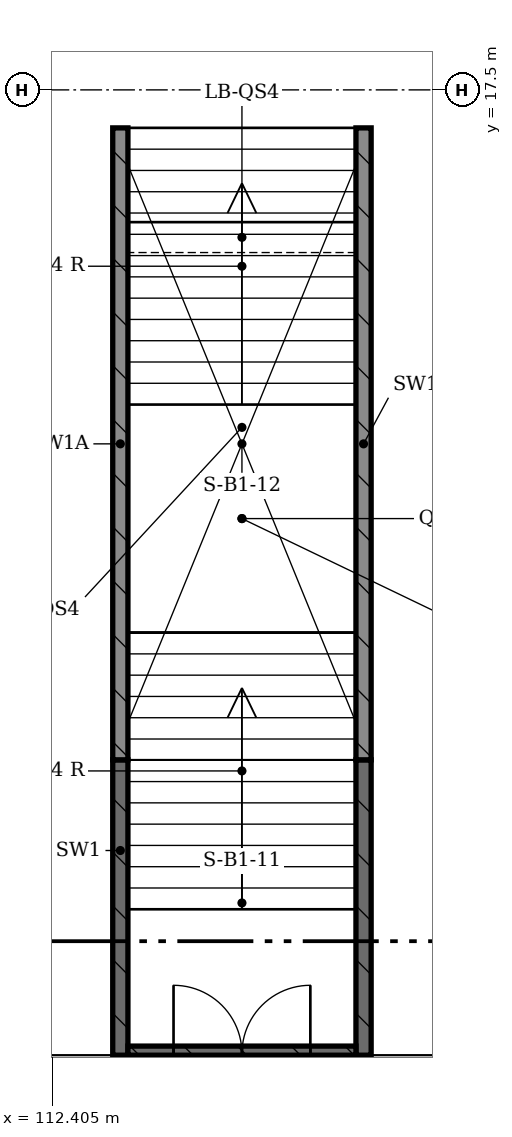
"""IFC4 building model, lengths in metres.
Left out: names, types, materials, properties, quantities, classifications, styles, units other than length and angle.
Written with IfcOpenShell. Run it as: python <this file> out.ifc"""

import sys

from ifc_helpers import new_model, si_unit, direction, frame, frame_2d, origin, place, context, subcontext, project, spatial, rectangle, extrude, element, fill, save


model = new_model("IFC4")
c1 = context("Model", 3, precision=1e-05, world=origin(), true_north=direction((0.0, 1.0)))
c2 = subcontext(c1, "Body", "Model", "MODEL_VIEW")
j1 = project(units=[si_unit("LENGTHUNIT", "METRE"), si_unit("PLANEANGLEUNIT", "RADIAN")], contexts=[c1])
p1 = place(None, origin())
s1 = spatial("IfcSite", under=j1, at=p1, CompositionType="ELEMENT")
p2 = place(p1, origin())
s2 = spatial("IfcBuilding", under=s1, at=p2, CompositionType="ELEMENT")
p3 = place(p2, frame((0.0, 0.0, -4.5)))
s3 = spatial("IfcBuildingStorey", under=s2, at=p3, CompositionType="ELEMENT", Elevation=-4.5)
for number, where, z_axis, x_axis in (
    (1, (113.3, 4.72, 0.0), (0.0, 0.0, 1.0), (0.0, 1.0, 0.0)),
    (2, (116.5, 4.72, 0.0), (0.0, 0.0, 1.0), (0.0, 1.0, 0.0)),
):
    element("IfcWall", number, at=place(p3, frame(where, z_axis=z_axis, x_axis=x_axis)), inside=s3, PredefinedType="SHEAR", context=c2, shape_type="SweptSolid", body=[
        extrude(rectangle(XDim=3.966, YDim=0.2, at=frame_2d((1.983, 0.0))), origin(), (0.0, 0.0, 1.0), 3.5),
    ])
p4 = place(p3, frame((113.4, 4.82, 0.0), z_axis=(0.0, 0.0, 1.0), x_axis=(1.0, 0.0, 0.0)))
e3 = element("IfcWall", 3, at=p4, inside=s3, PredefinedType="SHEAR", context=c2, shape_type="SweptSolid", body=[
    extrude(rectangle(XDim=3.0, YDim=0.2, at=frame_2d((1.5, 0.0))), origin(), (0.0, 0.0, 1.0), 3.5),
])
p5 = place(p4, frame((0.6, 0.0, 0.0)))
e4 = element("IfcOpeningElement", 4, at=p5, cuts=e3, PredefinedType="OPENING", context=c2, shape_type="SweptSolid", body=[
    extrude(rectangle(XDim=1.8, YDim=2.1, at=frame_2d((0.9, 1.05))), frame((0.0, 0.1, 0.0), z_axis=(0.0, -1.0, 0.0), x_axis=(1.0, 0.0, 0.0)), (0.0, 0.0, 1.0), 0.2),
])
for number, where, z_axis, x_axis in (
    (5, (113.3, 8.686, 0.0), (0.0, 0.0, 1.0), (0.0, 1.0, 0.0)),
    (6, (116.5, 8.686, 0.0), (0.0, 0.0, 1.0), (0.0, 1.0, 0.0)),
):
    element("IfcWall", number, at=place(p3, frame(where, z_axis=z_axis, x_axis=x_axis)), inside=s3, PredefinedType="SHEAR", context=c2, shape_type="SweptSolid", body=[
        extrude(rectangle(XDim=8.314, YDim=0.2, at=frame_2d((4.157, 0.0))), origin(), (0.0, 0.0, 1.0), 5.6),
    ])
p6 = place(p5, origin())
e7 = element("IfcDoor", 7, at=p6, inside=s3, OperationType="DOUBLE_DOOR_SINGLE_SWING", PredefinedType="DOOR", context=c2, shape_type="SweptSolid", body=[
    extrude(rectangle(XDim=1.8, YDim=2.1, at=frame_2d((0.9, 1.05))), frame((0.0, 0.025, 0.0), z_axis=(0.0, -1.0, 0.0), x_axis=(1.0, 0.0, 0.0)), (0.0, 0.0, 1.0), 0.05),
])
fill(e4, e7)
save(model, sys.argv[1])
